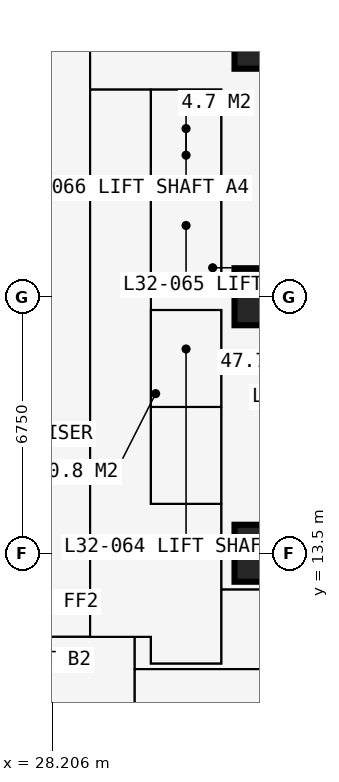
"""IFC4 building model, lengths in metres.
Left out: names, types, materials, properties, quantities, classifications, styles, units other than length and angle.
Written with IfcOpenShell. Run it as: python <this file> out.ifc"""

import sys

from ifc_helpers import new_model, si_unit, direction, frame, frame_2d, origin, origin_2d, place, context, subcontext, project, spatial, rectangle, extrude, element, fill, save


model = new_model("IFC4")
c1 = context("Model", 3, precision=1e-05, world=origin(), true_north=direction((0.0, 1.0)))
c2 = subcontext(c1, "Body", "Model", "MODEL_VIEW")
j1 = project(units=[si_unit("LENGTHUNIT", "METRE"), si_unit("PLANEANGLEUNIT", "RADIAN")], contexts=[c1])
p1 = place(None, origin())
s1 = spatial("IfcSite", under=j1, at=p1, CompositionType="ELEMENT")
p2 = place(p1, origin())
s2 = spatial("IfcBuilding", under=s1, at=p2, CompositionType="ELEMENT")
p3 = place(p2, frame((0.0, 0.0, 119.7)))
s3 = spatial("IfcBuildingStorey", under=s2, at=p3, CompositionType="ELEMENT", Elevation=119.7)
for number, where, z_axis, x_axis in (
    (1, (33.75, 13.5, 0.0), (0.0, 0.0, 1.0), (1.0, 0.0, 0.0)),
    (2, (33.75, 20.25, 0.0), (0.0, 0.0, 1.0), (1.0, 0.0, 0.0)),
    (3, (33.75, 27.0, 0.0), (0.0, 0.0, 1.0), (1.0, 0.0, 0.0)),
):
    element("IfcColumn", number, at=place(p3, frame(where, z_axis=z_axis, x_axis=x_axis)), inside=s3, PredefinedType="COLUMN", context=c2, shape_type="SweptSolid", body=[
        extrude(rectangle(XDim=1.5, YDim=1.5, at=origin_2d()), origin(), (0.0, 0.0, 1.0), 3.6),
    ])
p4 = place(p3, frame((10.125, 11.3, 0.0), z_axis=(0.0, 0.0, 1.0), x_axis=(1.0, 0.0, 0.0)))
e4 = element("IfcWall", 4, at=p4, inside=s3, PredefinedType="PARTITIONING", context=c2, shape_type="SweptSolid", body=[
    extrude(rectangle(XDim=20.675, YDim=0.15, at=frame_2d((10.337, 0.0))), origin(), (0.0, 0.0, 1.0), 3.375),
])
p5 = place(p4, frame((8.375, 0.0, 0.0)))
e5 = element("IfcOpeningElement", 5, at=p5, cuts=e4, PredefinedType="OPENING", context=c2, shape_type="SweptSolid", body=[
    extrude(rectangle(XDim=1.0, YDim=2.2, at=frame_2d((0.5, 1.1))), frame((0.0, 0.085, 0.0), z_axis=(0.0, -1.0, 0.0), x_axis=(1.0, 0.0, 0.0)), (0.0, 0.0, 1.0), 0.17),
])
p6 = place(p4, frame((10.975, 0.0, 0.0)))
e6 = element("IfcOpeningElement", 6, at=p6, cuts=e4, PredefinedType="OPENING", context=c2, shape_type="SweptSolid", body=[
    extrude(rectangle(XDim=1.0, YDim=2.2, at=frame_2d((0.5, 1.1))), frame((0.0, 0.085, 0.0), z_axis=(0.0, -1.0, 0.0), x_axis=(1.0, 0.0, 0.0)), (0.0, 0.0, 1.0), 0.17),
])
p7 = place(p4, frame((3.925, 0.0, 0.0)))
e7 = element("IfcOpeningElement", 7, at=p7, cuts=e4, PredefinedType="OPENING", context=c2, shape_type="SweptSolid", body=[
    extrude(rectangle(XDim=0.95, YDim=2.2, at=frame_2d((0.475, 1.1))), frame((0.0, 0.085, 0.0), z_axis=(0.0, -1.0, 0.0), x_axis=(1.0, 0.0, 0.0)), (0.0, 0.0, 1.0), 0.17),
])
p8 = place(p3, frame((29.2, 11.3, 0.0), z_axis=(0.0, 0.0, 1.0), x_axis=(0.0, 1.0, 0.0)))
e8 = element("IfcWall", 8, at=p8, inside=s3, PredefinedType="PARTITIONING", context=c2, shape_type="SweptSolid", body=[
    extrude(rectangle(XDim=17.9, YDim=0.2, at=frame_2d((8.95, 0.0))), origin(), (0.0, 0.0, 1.0), 3.375),
])
p9 = place(p8, frame((8.35, 0.0, 0.0)))
e9 = element("IfcOpeningElement", 9, at=p9, cuts=e8, PredefinedType="OPENING", context=c2, shape_type="SweptSolid", body=[
    extrude(rectangle(XDim=1.2, YDim=2.2, at=frame_2d((0.6, 1.1))), frame((0.0, 0.11, 0.0), z_axis=(0.0, -1.0, 0.0), x_axis=(1.0, 0.0, 0.0)), (0.0, 0.0, 1.0), 0.22),
])
p10 = place(p3, frame((29.2, 25.7, 0.0), z_axis=(0.0, 0.0, 1.0), x_axis=(1.0, 0.0, 0.0)))
e10 = element("IfcWall", 10, at=p10, inside=s3, PredefinedType="SHEAR", context=c2, shape_type="SweptSolid", body=[
    extrude(rectangle(XDim=3.45, YDim=0.1, at=frame_2d((1.725, 0.0))), origin(), (0.0, 0.0, 1.0), 3.375),
])
p11 = place(p3, frame((30.375, -0.734, 0.0), z_axis=(0.0, 0.0, 1.0), x_axis=(0.0, 1.0, 0.0)))
e11 = element("IfcWall", 11, at=p11, inside=s3, PredefinedType="PARTITIONING", context=c2, shape_type="SweptSolid", body=[
    extrude(rectangle(XDim=12.034, YDim=0.15, at=frame_2d((6.017, 0.0))), origin(), (0.0, 0.0, 1.0), 3.375),
])
p12 = place(p11, frame((4.884, 0.0, 0.0)))
e12 = element("IfcOpeningElement", 12, at=p12, cuts=e11, PredefinedType="OPENING", context=c2, shape_type="SweptSolid", body=[
    extrude(rectangle(XDim=1.0, YDim=2.2, at=frame_2d((0.5, 1.1))), frame((0.0, 0.085, 0.0), z_axis=(0.0, -1.0, 0.0), x_axis=(1.0, 0.0, 0.0)), (0.0, 0.0, 1.0), 0.17),
])
p13 = place(p3, frame((30.375, 10.45, 0.0), z_axis=(0.0, 0.0, 1.0), x_axis=(1.0, 0.0, 0.0)))
e13 = element("IfcWall", 13, at=p13, inside=s3, PredefinedType="PARTITIONING", context=c2, shape_type="SweptSolid", body=[
    extrude(rectangle(XDim=5.275, YDim=0.15, at=frame_2d((2.637, 0.0))), origin(), (0.0, 0.0, 1.0), 3.375),
])
p14 = place(p13, frame((2.35, 0.0, 0.0)))
e14 = element("IfcOpeningElement", 14, at=p14, cuts=e13, PredefinedType="OPENING", context=c2, shape_type="SweptSolid", body=[
    extrude(rectangle(XDim=0.95, YDim=2.2, at=frame_2d((0.475, 1.1))), frame((0.0, 0.085, 0.0), z_axis=(0.0, -1.0, 0.0), x_axis=(1.0, 0.0, 0.0)), (0.0, 0.0, 1.0), 0.17),
])
p15 = place(p3, frame((30.8, 10.6, 0.0), z_axis=(0.0, 0.0, 1.0), x_axis=(0.0, 1.0, 0.0)))
e15 = element("IfcWall", 15, at=p15, inside=s3, PredefinedType="PARTITIONING", context=c2, shape_type="SweptSolid", body=[
    extrude(rectangle(XDim=0.7, YDim=0.15, at=frame_2d((0.35, 0.0))), origin(), (0.0, 0.0, 1.0), 3.375),
])
p16 = place(p3, frame((30.8, 10.6, 0.0), z_axis=(0.0, 0.0, 1.0), x_axis=(1.0, 0.0, 0.0)))
e16 = element("IfcWall", 16, at=p16, inside=s3, PredefinedType="PARTITIONING", context=c2, shape_type="SweptSolid", body=[
    extrude(rectangle(XDim=1.85, YDim=0.15, at=frame_2d((0.925, 0.0))), origin(), (0.0, 0.0, 1.0), 3.375),
])
p17 = place(p3, frame((30.8, 14.8, 0.0), z_axis=(0.0, 0.0, 1.0), x_axis=(0.0, 1.0, 0.0)))
e17 = element("IfcWall", 17, at=p17, inside=s3, PredefinedType="PARTITIONING", context=c2, shape_type="SweptSolid", body=[
    extrude(rectangle(XDim=10.9, YDim=0.15, at=frame_2d((5.45, 0.0))), origin(), (0.0, 0.0, 1.0), 3.375),
])
p18 = place(p17, frame((0.75, 0.0, 0.0)))
e18 = element("IfcOpeningElement", 18, at=p18, cuts=e17, PredefinedType="OPENING", context=c2, shape_type="SweptSolid", body=[
    extrude(rectangle(XDim=1.1, YDim=2.2, at=frame_2d((0.55, 1.1))), frame((0.0, 0.085, 0.0), z_axis=(0.0, -1.0, 0.0), x_axis=(1.0, 0.0, 0.0)), (0.0, 0.0, 1.0), 0.17),
])
p19 = place(p17, frame((3.25, 0.0, 0.0)))
e19 = element("IfcOpeningElement", 19, at=p19, cuts=e17, PredefinedType="OPENING", context=c2, shape_type="SweptSolid", body=[
    extrude(rectangle(XDim=1.1, YDim=2.2, at=frame_2d((0.55, 1.1))), frame((0.0, 0.085, 0.0), z_axis=(0.0, -1.0, 0.0), x_axis=(1.0, 0.0, 0.0)), (0.0, 0.0, 1.0), 0.17),
])
p20 = place(p17, frame((6.5, 0.0, 0.0)))
e20 = element("IfcOpeningElement", 20, at=p20, cuts=e17, PredefinedType="OPENING", context=c2, shape_type="SweptSolid", body=[
    extrude(rectangle(XDim=1.1, YDim=2.2, at=frame_2d((0.55, 1.1))), frame((0.0, 0.085, 0.0), z_axis=(0.0, -1.0, 0.0), x_axis=(1.0, 0.0, 0.0)), (0.0, 0.0, 1.0), 0.17),
])
p21 = place(p17, frame((9.05, 0.0, 0.0)))
e21 = element("IfcOpeningElement", 21, at=p21, cuts=e17, PredefinedType="OPENING", context=c2, shape_type="SweptSolid", body=[
    extrude(rectangle(XDim=1.1, YDim=2.2, at=frame_2d((0.55, 1.1))), frame((0.0, 0.085, 0.0), z_axis=(0.0, -1.0, 0.0), x_axis=(1.0, 0.0, 0.0)), (0.0, 0.0, 1.0), 0.17),
])
for number, where, z_axis, x_axis in (
    (22, (30.8, 14.8, 0.0), (0.0, 0.0, 1.0), (1.0, 0.0, 0.0)),
    (23, (30.8, 17.35, 0.0), (0.0, 0.0, 1.0), (1.0, 0.0, 0.0)),
    (24, (30.8, 19.9, 0.0), (0.0, 0.0, 1.0), (1.0, 0.0, 0.0)),
    (25, (30.8, 20.6, 0.0), (0.0, 0.0, 1.0), (1.0, 0.0, 0.0)),
    (26, (30.8, 23.15, 0.0), (0.0, 0.0, 1.0), (1.0, 0.0, 0.0)),
):
    element("IfcWall", number, at=place(p3, frame(where, z_axis=z_axis, x_axis=x_axis)), inside=s3, PredefinedType="SHEAR", context=c2, shape_type="SweptSolid", body=[
        extrude(rectangle(XDim=1.85, YDim=0.1, at=frame_2d((0.925, 0.0))), origin(), (0.0, 0.0, 1.0), 3.375),
    ])
p22 = place(p3, frame((32.65, 10.6, 0.0), z_axis=(0.0, 0.0, 1.0), x_axis=(0.0, 1.0, 0.0)))
e27 = element("IfcWall", 27, at=p22, inside=s3, PredefinedType="SHEAR", context=c2, shape_type="SweptSolid", body=[
    extrude(rectangle(XDim=9.3, YDim=0.1, at=frame_2d((4.65, 0.0))), origin(), (0.0, 0.0, 1.0), 3.375),
])
p23 = place(p22, frame((0.5, 0.0, 0.0)))
e28 = element("IfcOpeningElement", 28, at=p23, cuts=e27, PredefinedType="OPENING", context=c2, shape_type="SweptSolid", body=[
    extrude(rectangle(XDim=1.0, YDim=2.2, at=frame_2d((0.5, 1.1))), frame((0.0, 0.06, 0.0), z_axis=(0.0, -1.0, 0.0), x_axis=(1.0, 0.0, 0.0)), (0.0, 0.0, 1.0), 0.12),
])
p24 = place(p3, frame((32.65, 12.55, 0.0), z_axis=(0.0, 0.0, 1.0), x_axis=(1.0, 0.0, 0.0)))
e29 = element("IfcWall", 29, at=p24, inside=s3, PredefinedType="PARTITIONING", context=c2, shape_type="SweptSolid", body=[
    extrude(rectangle(XDim=3.0, YDim=0.15, at=frame_2d((1.5, 0.0))), origin(), (0.0, 0.0, 1.0), 3.375),
])
p25 = place(p3, frame((32.65, 20.6, 0.0), z_axis=(0.0, 0.0, 1.0), x_axis=(0.0, 1.0, 0.0)))
e30 = element("IfcWall", 30, at=p25, inside=s3, PredefinedType="PARTITIONING", context=c2, shape_type="SweptSolid", body=[
    extrude(rectangle(XDim=5.1, YDim=0.15, at=frame_2d((2.55, 0.0))), origin(), (0.0, 0.0, 1.0), 3.375),
])
p26 = place(p23, origin())
e31 = element("IfcDoor", 31, at=p26, inside=s3, OperationType="SINGLE_SWING_LEFT", PredefinedType="DOOR", context=c2, shape_type="SweptSolid", body=[
    extrude(rectangle(XDim=1.0, YDim=2.2, at=frame_2d((0.5, 1.1))), frame((0.0, 0.025, 0.0), z_axis=(0.0, -1.0, 0.0), x_axis=(1.0, 0.0, 0.0)), (0.0, 0.0, 1.0), 0.05),
])
fill(e28, e31)
p27 = place(p14, origin())
e32 = element("IfcDoor", 32, at=p27, inside=s3, OperationType="SINGLE_SWING_LEFT", PredefinedType="DOOR", context=c2, shape_type="SweptSolid", body=[
    extrude(rectangle(XDim=0.95, YDim=2.2, at=frame_2d((0.475, 1.1))), frame((0.0, 0.025, 0.0), z_axis=(0.0, -1.0, 0.0), x_axis=(1.0, 0.0, 0.0)), (0.0, 0.0, 1.0), 0.05),
])
fill(e14, e32)
p28 = place(p18, origin())
e33 = element("IfcDoor", 33, at=p28, inside=s3, OperationType="DOUBLE_DOOR_SLIDING", PredefinedType="DOOR", context=c2, shape_type="SweptSolid", body=[
    extrude(rectangle(XDim=1.1, YDim=2.2, at=frame_2d((0.55, 1.1))), frame((0.0, 0.025, 0.0), z_axis=(0.0, -1.0, 0.0), x_axis=(1.0, 0.0, 0.0)), (0.0, 0.0, 1.0), 0.05),
])
fill(e18, e33)
p29 = place(p19, origin())
e34 = element("IfcDoor", 34, at=p29, inside=s3, OperationType="DOUBLE_DOOR_SLIDING", PredefinedType="DOOR", context=c2, shape_type="SweptSolid", body=[
    extrude(rectangle(XDim=1.1, YDim=2.2, at=frame_2d((0.55, 1.1))), frame((0.0, 0.025, 0.0), z_axis=(0.0, -1.0, 0.0), x_axis=(1.0, 0.0, 0.0)), (0.0, 0.0, 1.0), 0.05),
])
fill(e19, e34)
p30 = place(p20, origin())
e35 = element("IfcDoor", 35, at=p30, inside=s3, OperationType="DOUBLE_DOOR_SLIDING", PredefinedType="DOOR", context=c2, shape_type="SweptSolid", body=[
    extrude(rectangle(XDim=1.1, YDim=2.2, at=frame_2d((0.55, 1.1))), frame((0.0, 0.025, 0.0), z_axis=(0.0, -1.0, 0.0), x_axis=(1.0, 0.0, 0.0)), (0.0, 0.0, 1.0), 0.05),
])
fill(e20, e35)
p31 = place(p21, origin())
e36 = element("IfcDoor", 36, at=p31, inside=s3, OperationType="DOUBLE_DOOR_SLIDING", PredefinedType="DOOR", context=c2, shape_type="SweptSolid", body=[
    extrude(rectangle(XDim=1.1, YDim=2.2, at=frame_2d((0.55, 1.1))), frame((0.0, 0.025, 0.0), z_axis=(0.0, -1.0, 0.0), x_axis=(1.0, 0.0, 0.0)), (0.0, 0.0, 1.0), 0.05),
])
fill(e21, e36)
p32 = place(p9, origin())
e37 = element("IfcDoor", 37, at=p32, inside=s3, OperationType="DOUBLE_DOOR_SINGLE_SWING", PredefinedType="DOOR", context=c2, shape_type="SweptSolid", body=[
    extrude(rectangle(XDim=1.2, YDim=2.2, at=frame_2d((0.6, 1.1))), frame((0.0, 0.025, 0.0), z_axis=(0.0, -1.0, 0.0), x_axis=(1.0, 0.0, 0.0)), (0.0, 0.0, 1.0), 0.05),
])
fill(e9, e37)
save(model, sys.argv[1])
